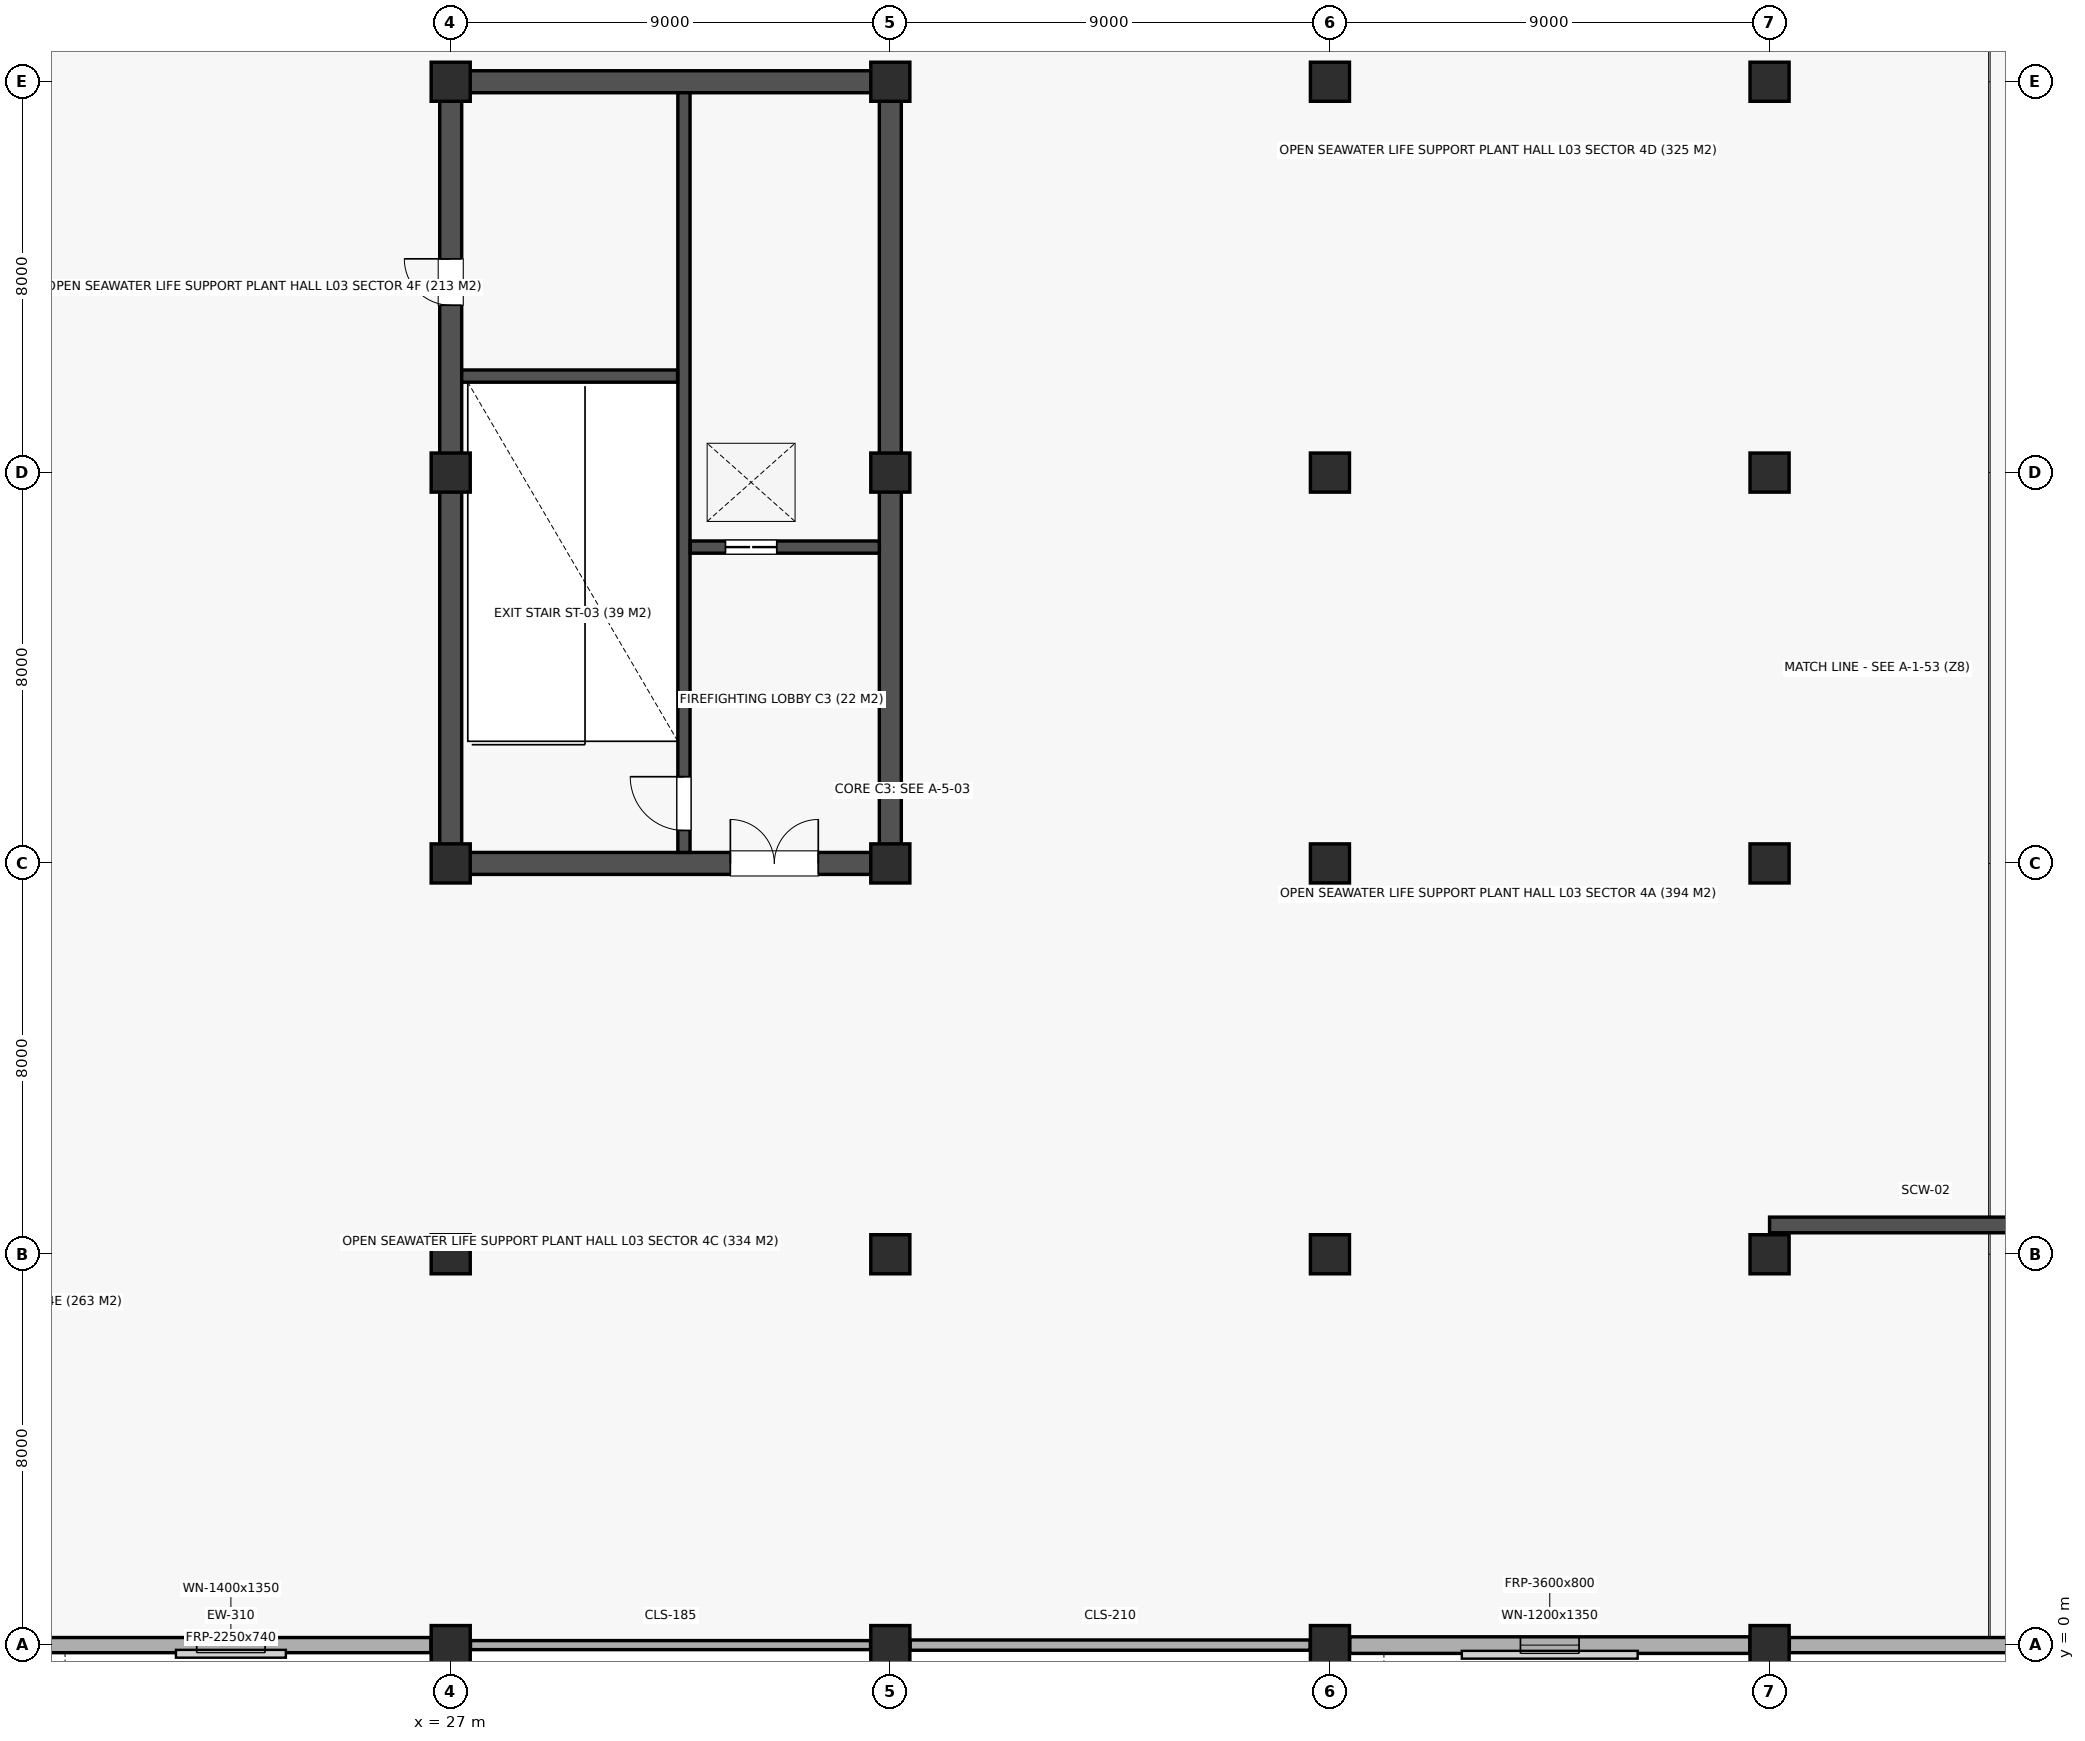
"""IFC4 building model, lengths in metres.
Left out: names, types, materials, properties, quantities, classifications, styles, units other than length and angle.
Written with IfcOpenShell. Run it as: python <this file> out.ifc"""

import sys

from ifc_helpers import new_model, si_unit, direction, frame, frame_2d, origin, origin_2d, place, context, subcontext, project, spatial, rectangle, extrude, element, fill, save


model = new_model("IFC4")
c1 = context("Model", 3, precision=1e-05, world=origin(), true_north=direction((0.0, 1.0)))
c2 = subcontext(c1, "Body", "Model", "MODEL_VIEW")
j1 = project(units=[si_unit("LENGTHUNIT", "METRE"), si_unit("PLANEANGLEUNIT", "RADIAN")], contexts=[c1])
p1 = place(None, origin())
s1 = spatial("IfcSite", under=j1, at=p1, CompositionType="ELEMENT")
p2 = place(p1, origin())
s2 = spatial("IfcBuilding", under=s1, at=p2, CompositionType="ELEMENT")
p3 = place(p2, frame((0.0, 0.0, 13.5)))
s3 = spatial("IfcBuildingStorey", under=s2, at=p3, CompositionType="ELEMENT", Elevation=13.5)
for number, where, z_axis, x_axis in (
    (1, (27.0, 0.0, 0.0), (0.0, 0.0, 1.0), (1.0, 0.0, 0.0)),
    (2, (27.0, 8.0, 0.0), (0.0, 0.0, 1.0), (1.0, 0.0, 0.0)),
    (3, (27.0, 16.0, 0.0), (0.0, 0.0, 1.0), (1.0, 0.0, 0.0)),
    (4, (27.0, 24.0, 0.0), (0.0, 0.0, 1.0), (1.0, 0.0, 0.0)),
    (5, (27.0, 32.0, 0.0), (0.0, 0.0, 1.0), (1.0, 0.0, 0.0)),
    (6, (36.0, 0.0, 0.0), (0.0, 0.0, 1.0), (1.0, 0.0, 0.0)),
    (7, (36.0, 8.0, 0.0), (0.0, 0.0, 1.0), (1.0, 0.0, 0.0)),
    (8, (36.0, 16.0, 0.0), (0.0, 0.0, 1.0), (1.0, 0.0, 0.0)),
    (9, (36.0, 24.0, 0.0), (0.0, 0.0, 1.0), (1.0, 0.0, 0.0)),
    (10, (36.0, 32.0, 0.0), (0.0, 0.0, 1.0), (1.0, 0.0, 0.0)),
    (11, (45.0, 0.0, 0.0), (0.0, 0.0, 1.0), (1.0, 0.0, 0.0)),
    (12, (45.0, 8.0, 0.0), (0.0, 0.0, 1.0), (1.0, 0.0, 0.0)),
    (13, (45.0, 16.0, 0.0), (0.0, 0.0, 1.0), (1.0, 0.0, 0.0)),
    (14, (45.0, 24.0, 0.0), (0.0, 0.0, 1.0), (1.0, 0.0, 0.0)),
    (15, (45.0, 32.0, 0.0), (0.0, 0.0, 1.0), (1.0, 0.0, 0.0)),
    (16, (54.0, 0.0, 0.0), (0.0, 0.0, 1.0), (1.0, 0.0, 0.0)),
    (17, (54.0, 8.0, 0.0), (0.0, 0.0, 1.0), (1.0, 0.0, 0.0)),
    (18, (54.0, 16.0, 0.0), (0.0, 0.0, 1.0), (1.0, 0.0, 0.0)),
    (19, (54.0, 24.0, 0.0), (0.0, 0.0, 1.0), (1.0, 0.0, 0.0)),
    (20, (54.0, 32.0, 0.0), (0.0, 0.0, 1.0), (1.0, 0.0, 0.0)),
):
    element("IfcColumn", number, at=place(p3, frame(where, z_axis=z_axis, x_axis=x_axis)), inside=s3, PredefinedType="COLUMN", context=c2, shape_type="SweptSolid", body=[
        extrude(rectangle(XDim=0.8, YDim=0.8, at=origin_2d()), origin(), (0.0, 0.0, 1.0), 4.2),
    ])
p4 = place(p3, frame((54.0, 8.6, 0.0), z_axis=(0.0, 0.0, 1.0), x_axis=(1.0, 0.0, 0.0)))
e21 = element("IfcWall", 21, at=p4, inside=s3, PredefinedType="SOLIDWALL", context=c2, shape_type="SweptSolid", body=[
    extrude(rectangle(XDim=9.0, YDim=0.32, at=frame_2d((4.5, 0.0))), origin(), (0.0, 0.0, 1.0), 4.2),
])
p5 = place(p3, frame((27.225, 16.0, 0.0), z_axis=(0.0, 0.0, 1.0), x_axis=(1.0, 0.0, 0.0)))
e22 = element("IfcWall", 22, at=p5, inside=s3, PredefinedType="SHEAR", context=c2, shape_type="SweptSolid", body=[
    extrude(rectangle(XDim=8.55, YDim=0.45, at=frame_2d((4.275, 0.0))), origin(), (0.0, 0.0, 1.0), 4.2),
])
p6 = place(p5, frame((5.5, 0.0, 0.0)))
e23 = element("IfcOpeningElement", 23, at=p6, cuts=e22, PredefinedType="OPENING", context=c2, shape_type="SweptSolid", body=[
    extrude(rectangle(XDim=1.8, YDim=2.18, at=frame_2d((0.9, 1.09))), frame((0.0, 0.237, 0.0), z_axis=(0.0, -1.0, 0.0), x_axis=(1.0, 0.0, 0.0)), (0.0, 0.0, 1.0), 0.474),
])
p7 = place(p3, frame((27.225, 32.0, 0.0), z_axis=(0.0, 0.0, 1.0), x_axis=(1.0, 0.0, 0.0)))
e24 = element("IfcWall", 24, at=p7, inside=s3, PredefinedType="SHEAR", context=c2, shape_type="SweptSolid", body=[
    extrude(rectangle(XDim=8.55, YDim=0.45, at=frame_2d((4.275, 0.0))), origin(), (0.0, 0.0, 1.0), 4.2),
])
p8 = place(p3, frame((27.0, 16.225, 0.0), z_axis=(0.0, 0.0, 1.0), x_axis=(0.0, 1.0, 0.0)))
e25 = element("IfcWall", 25, at=p8, inside=s3, PredefinedType="SHEAR", context=c2, shape_type="SweptSolid", body=[
    extrude(rectangle(XDim=15.55, YDim=0.45, at=frame_2d((7.775, 0.0))), origin(), (0.0, 0.0, 1.0), 4.2),
])
p9 = place(p8, frame((11.2, 0.0, 0.0)))
e26 = element("IfcOpeningElement", 26, at=p9, cuts=e25, PredefinedType="OPENING", context=c2, shape_type="SweptSolid", body=[
    extrude(rectangle(XDim=0.95, YDim=2.1, at=frame_2d((0.475, 1.05))), frame((0.0, 0.237, 0.0), z_axis=(0.0, -1.0, 0.0), x_axis=(1.0, 0.0, 0.0)), (0.0, 0.0, 1.0), 0.474),
])
p10 = place(p3, frame((36.0, 16.225, 0.0), z_axis=(0.0, 0.0, 1.0), x_axis=(0.0, 1.0, 0.0)))
e27 = element("IfcWall", 27, at=p10, inside=s3, PredefinedType="SHEAR", context=c2, shape_type="SweptSolid", body=[
    extrude(rectangle(XDim=15.55, YDim=0.45, at=frame_2d((7.775, 0.0))), origin(), (0.0, 0.0, 1.0), 4.2),
])
p11 = place(p3, frame((31.775, 16.225, 0.0), z_axis=(0.0, 0.0, 1.0), x_axis=(0.0, 1.0, 0.0)))
e28 = element("IfcWall", 28, at=p11, inside=s3, PredefinedType="SOLIDWALL", context=c2, shape_type="SweptSolid", body=[
    extrude(rectangle(XDim=15.55, YDim=0.25, at=frame_2d((7.775, 0.0))), origin(), (0.0, 0.0, 1.0), 4.2),
])
p12 = place(p11, frame((0.45, 0.0, 0.0)))
e29 = element("IfcOpeningElement", 29, at=p12, cuts=e28, PredefinedType="OPENING", context=c2, shape_type="SweptSolid", body=[
    extrude(rectangle(XDim=1.1, YDim=2.15, at=frame_2d((0.55, 1.075))), frame((0.0, 0.137, 0.0), z_axis=(0.0, -1.0, 0.0), x_axis=(1.0, 0.0, 0.0)), (0.0, 0.0, 1.0), 0.274),
])
p13 = place(p3, frame((27.225, 25.975, 0.0), z_axis=(0.0, 0.0, 1.0), x_axis=(1.0, 0.0, 0.0)))
e30 = element("IfcWall", 30, at=p13, inside=s3, PredefinedType="SOLIDWALL", context=c2, shape_type="SweptSolid", body=[
    extrude(rectangle(XDim=4.42, YDim=0.25, at=frame_2d((2.21, 0.0))), origin(), (0.0, 0.0, 1.0), 4.2),
])
p14 = place(p3, frame((31.905, 22.475, 0.0), z_axis=(0.0, 0.0, 1.0), x_axis=(1.0, 0.0, 0.0)))
e31 = element("IfcWall", 31, at=p14, inside=s3, PredefinedType="SOLIDWALL", context=c2, shape_type="SweptSolid", body=[
    extrude(rectangle(XDim=3.87, YDim=0.25, at=frame_2d((1.935, 0.0))), origin(), (0.0, 0.0, 1.0), 4.2),
])
p15 = place(p14, frame((0.72, 0.0, 0.0)))
e32 = element("IfcOpeningElement", 32, at=p15, cuts=e31, PredefinedType="OPENING", context=c2, shape_type="SweptSolid", body=[
    extrude(rectangle(XDim=1.05, YDim=2.12, at=frame_2d((0.525, 1.06))), frame((0.0, 0.137, 0.0), z_axis=(0.0, -1.0, 0.0), x_axis=(1.0, 0.0, 0.0)), (0.0, 0.0, 1.0), 0.274),
])
p16 = place(p3, frame((18.405, 0.0, 0.0), z_axis=(0.0, 0.0, 1.0), x_axis=(1.0, 0.0, 0.0)))
e33 = element("IfcWall", 33, at=p16, inside=s3, PredefinedType="STANDARD", context=c2, shape_type="SweptSolid", body=[
    extrude(rectangle(XDim=8.19, YDim=0.31, at=frame_2d((4.095, 0.0))), origin(), (0.0, 0.0, 1.0), 3.48),
])
p17 = place(p16, frame((3.395, 0.0, 0.85)))
e34 = element("IfcOpeningElement", 34, at=p17, cuts=e33, PredefinedType="OPENING", context=c2, shape_type="SweptSolid", body=[
    extrude(rectangle(XDim=1.4, YDim=1.35, at=frame_2d((0.7, 0.675))), frame((0.0, 0.167, 0.0), z_axis=(0.0, -1.0, 0.0), x_axis=(1.0, 0.0, 0.0)), (0.0, 0.0, 1.0), 0.334),
])
p18 = place(p3, frame((27.405, 0.0, 0.0), z_axis=(0.0, 0.0, 1.0), x_axis=(1.0, 0.0, 0.0)))
e35 = element("IfcWall", 35, at=p18, inside=s3, PredefinedType="ELEMENTEDWALL", context=c2, shape_type="SweptSolid", body=[
    extrude(rectangle(XDim=8.19, YDim=0.185, at=frame_2d((4.095, 0.0))), origin(), (0.0, 0.0, 1.0), 3.48),
])
p19 = place(p3, frame((36.405, 0.0, 0.0), z_axis=(0.0, 0.0, 1.0), x_axis=(1.0, 0.0, 0.0)))
e36 = element("IfcWall", 36, at=p19, inside=s3, PredefinedType="ELEMENTEDWALL", context=c2, shape_type="SweptSolid", body=[
    extrude(rectangle(XDim=8.19, YDim=0.21, at=frame_2d((4.095, 0.0))), origin(), (0.0, 0.0, 1.0), 3.48),
])
p20 = place(p3, frame((45.405, 0.0, 0.0), z_axis=(0.0, 0.0, 1.0), x_axis=(1.0, 0.0, 0.0)))
e37 = element("IfcWall", 37, at=p20, inside=s3, PredefinedType="STANDARD", context=c2, shape_type="SweptSolid", body=[
    extrude(rectangle(XDim=8.19, YDim=0.34, at=frame_2d((4.095, 0.0))), origin(), (0.0, 0.0, 1.0), 3.48),
])
p21 = place(p20, frame((3.495, 0.0, 0.85)))
e38 = element("IfcOpeningElement", 38, at=p21, cuts=e37, PredefinedType="OPENING", context=c2, shape_type="SweptSolid", body=[
    extrude(rectangle(XDim=1.2, YDim=1.35, at=frame_2d((0.6, 0.675))), frame((0.0, 0.182, 0.0), z_axis=(0.0, -1.0, 0.0), x_axis=(1.0, 0.0, 0.0)), (0.0, 0.0, 1.0), 0.364),
])
p22 = place(p3, frame((54.405, 0.0, 0.0), z_axis=(0.0, 0.0, 1.0), x_axis=(1.0, 0.0, 0.0)))
e39 = element("IfcWall", 39, at=p22, inside=s3, PredefinedType="STANDARD", context=c2, shape_type="SweptSolid", body=[
    extrude(rectangle(XDim=8.19, YDim=0.31, at=frame_2d((4.095, 0.0))), origin(), (0.0, 0.0, 1.0), 3.48),
])
p23 = place(p6, origin())
e40 = element("IfcDoor", 40, at=p23, inside=s3, OperationType="DOUBLE_DOOR_SINGLE_SWING", PredefinedType="DOOR", context=c2, shape_type="SweptSolid", body=[
    extrude(rectangle(XDim=1.8, YDim=2.18, at=frame_2d((0.9, 1.09))), frame((0.0, 0.025, 0.0), z_axis=(0.0, -1.0, 0.0), x_axis=(1.0, 0.0, 0.0)), (0.0, 0.0, 1.0), 0.05),
])
fill(e23, e40)
p24 = place(p12, origin())
e41 = element("IfcDoor", 41, at=p24, inside=s3, OperationType="SINGLE_SWING_RIGHT", PredefinedType="DOOR", context=c2, shape_type="SweptSolid", body=[
    extrude(rectangle(XDim=1.1, YDim=2.15, at=frame_2d((0.55, 1.075))), frame((0.0, 0.025, 0.0), z_axis=(0.0, -1.0, 0.0), x_axis=(1.0, 0.0, 0.0)), (0.0, 0.0, 1.0), 0.05),
])
fill(e29, e41)
p25 = place(p9, origin())
e42 = element("IfcDoor", 42, at=p25, inside=s3, OperationType="SINGLE_SWING_RIGHT", PredefinedType="DOOR", context=c2, shape_type="SweptSolid", body=[
    extrude(rectangle(XDim=0.95, YDim=2.1, at=frame_2d((0.475, 1.05))), frame((0.0, 0.025, 0.0), z_axis=(0.0, -1.0, 0.0), x_axis=(1.0, 0.0, 0.0)), (0.0, 0.0, 1.0), 0.05),
])
fill(e26, e42)
p26 = place(p15, origin())
e43 = element("IfcDoor", 43, at=p26, inside=s3, OperationType="DOUBLE_DOOR_SLIDING", PredefinedType="DOOR", context=c2, shape_type="SweptSolid", body=[
    extrude(rectangle(XDim=1.05, YDim=2.12, at=frame_2d((0.525, 1.06))), frame((0.0, 0.025, 0.0), z_axis=(0.0, -1.0, 0.0), x_axis=(1.0, 0.0, 0.0)), (0.0, 0.0, 1.0), 0.05),
])
fill(e32, e43)
p27 = place(p17, origin())
e44 = element("IfcWindow", 44, at=p27, inside=s3, PartitioningType="SINGLE_PANEL", PredefinedType="WINDOW", context=c2, shape_type="SweptSolid", body=[
    extrude(rectangle(XDim=1.4, YDim=1.35, at=frame_2d((0.7, 0.675))), frame((0.0, 0.03, 0.0), z_axis=(0.0, -1.0, 0.0), x_axis=(1.0, 0.0, 0.0)), (0.0, 0.0, 1.0), 0.06),
])
fill(e34, e44)
p28 = place(p21, origin())
e45 = element("IfcWindow", 45, at=p28, inside=s3, PartitioningType="SINGLE_PANEL", PredefinedType="WINDOW", context=c2, shape_type="SweptSolid", body=[
    extrude(rectangle(XDim=1.2, YDim=1.35, at=frame_2d((0.6, 0.675))), frame((0.0, 0.03, 0.0), z_axis=(0.0, -1.0, 0.0), x_axis=(1.0, 0.0, 0.0)), (0.0, 0.0, 1.0), 0.06),
])
fill(e38, e45)
save(model, sys.argv[1])
